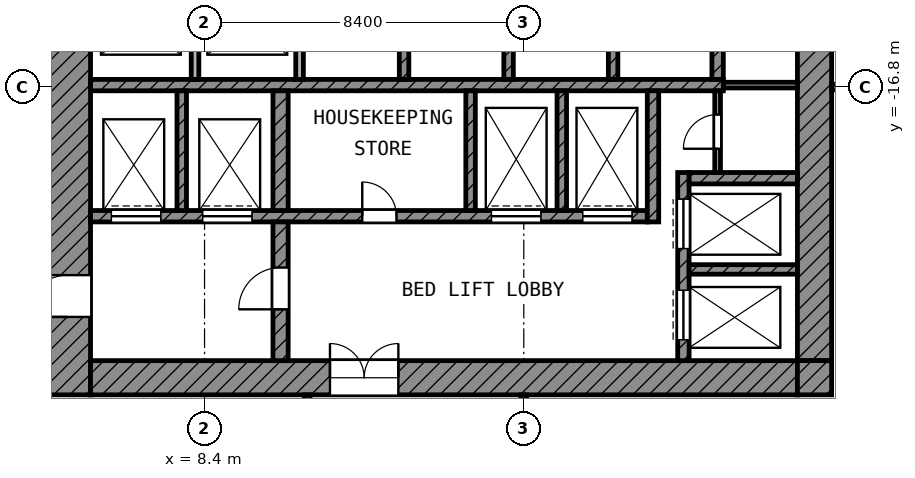
"""IFC4 building model, lengths in metres.
Left out: names, types, materials, properties, quantities, classifications, styles, units other than length and angle.
Written with IfcOpenShell. Run it as: python <this file> out.ifc"""

import sys

from ifc_helpers import new_model, si_unit, direction, frame, frame_2d, origin, place, context, subcontext, project, spatial, rectangle, extrude, element, fill, save


model = new_model("IFC4")
c1 = context("Model", 3, precision=1e-05, world=origin(), true_north=direction((0.0, 1.0)))
c2 = subcontext(c1, "Body", "Model", "MODEL_VIEW")
j1 = project(units=[si_unit("LENGTHUNIT", "METRE"), si_unit("PLANEANGLEUNIT", "RADIAN")], contexts=[c1])
p1 = place(None, origin())
s1 = spatial("IfcSite", under=j1, at=p1, CompositionType="ELEMENT")
p2 = place(p1, origin())
s2 = spatial("IfcBuilding", under=s1, at=p2, CompositionType="ELEMENT")
p3 = place(p2, frame((0.0, 0.0, 183.6)))
s3 = spatial("IfcBuildingStorey", under=s2, at=p3, CompositionType="ELEMENT", Elevation=183.6)
p4 = place(p3, frame((4.8, -24.9, 0.0), z_axis=(0.0, 0.0, 1.0), x_axis=(0.0, 1.0, 0.0)))
e1 = element("IfcWall", 1, at=p4, inside=s3, PredefinedType="SHEAR", context=c2, shape_type="SweptSolid", body=[
    extrude(rectangle(XDim=19.5, YDim=1.2, at=frame_2d((9.75, 0.0))), origin(), (0.0, 0.0, 1.0), 3.6),
])
p5 = place(p4, frame((11.35, 0.0, 0.0)))
e2 = element("IfcOpeningElement", 2, at=p5, cuts=e1, PredefinedType="OPENING", context=c2, shape_type="SweptSolid", body=[
    extrude(rectangle(XDim=1.1, YDim=2.1, at=frame_2d((0.55, 1.05))), frame((0.0, 0.61, 0.0), z_axis=(0.0, -1.0, 0.0), x_axis=(1.0, 0.0, 0.0)), (0.0, 0.0, 1.0), 1.22),
])
p6 = place(p4, frame((2.05, 0.0, 0.0)))
e3 = element("IfcOpeningElement", 3, at=p6, cuts=e1, PredefinedType="OPENING", context=c2, shape_type="SweptSolid", body=[
    extrude(rectangle(XDim=1.1, YDim=2.1, at=frame_2d((0.55, 1.05))), frame((0.0, 0.61, 0.0), z_axis=(0.0, -1.0, 0.0), x_axis=(1.0, 0.0, 0.0)), (0.0, 0.0, 1.0), 1.22),
])
p7 = place(p3, frame((24.45, -24.0, 0.0), z_axis=(0.0, 0.0, 1.0), x_axis=(0.0, 1.0, 0.0)))
e4 = element("IfcWall", 4, at=p7, inside=s3, PredefinedType="SHEAR", context=c2, shape_type="SweptSolid", body=[
    extrude(rectangle(XDim=18.6, YDim=0.9, at=frame_2d((9.3, 0.0))), origin(), (0.0, 0.0, 1.0), 3.6),
])
p8 = place(p7, frame((10.5, 0.0, 0.0)))
e5 = element("IfcOpeningElement", 5, at=p8, cuts=e4, PredefinedType="OPENING", context=c2, shape_type="SweptSolid", body=[
    extrude(rectangle(XDim=1.8, YDim=2.1, at=frame_2d((0.9, 1.05))), frame((0.0, 0.46, 0.0), z_axis=(0.0, -1.0, 0.0), x_axis=(1.0, 0.0, 0.0)), (0.0, 0.0, 1.0), 0.92),
])
p9 = place(p3, frame((5.4, -24.45, 0.0), z_axis=(0.0, 0.0, 1.0), x_axis=(1.0, 0.0, 0.0)))
e6 = element("IfcWall", 6, at=p9, inside=s3, PredefinedType="SHEAR", context=c2, shape_type="SweptSolid", body=[
    extrude(rectangle(XDim=18.6, YDim=0.9, at=frame_2d((9.3, 0.0))), origin(), (0.0, 0.0, 1.0), 3.6),
])
p10 = place(p9, frame((6.3, 0.0, 0.0)))
e7 = element("IfcOpeningElement", 7, at=p10, cuts=e6, PredefinedType="OPENING", context=c2, shape_type="SweptSolid", body=[
    extrude(rectangle(XDim=1.8, YDim=2.1, at=frame_2d((0.9, 1.05))), frame((0.0, 0.46, 0.0), z_axis=(0.0, -1.0, 0.0), x_axis=(1.0, 0.0, 0.0)), (0.0, 0.0, 1.0), 0.92),
])
p11 = place(p3, frame((24.45, -24.9, 0.0), z_axis=(0.0, 0.0, 1.0), x_axis=(0.0, 1.0, 0.0)))
e8 = element("IfcWall", 8, at=p11, inside=s3, PredefinedType="SHEAR", context=c2, shape_type="SweptSolid", body=[
    extrude(rectangle(XDim=0.9, YDim=0.9, at=frame_2d((0.45, 0.0))), origin(), (0.0, 0.0, 1.0), 3.6),
])
p12 = place(p3, frame((5.4, -16.75, 0.0), z_axis=(0.0, 0.0, 1.0), x_axis=(1.0, 0.0, 0.0)))
e9 = element("IfcWall", 9, at=p12, inside=s3, PredefinedType="SHEAR", context=c2, shape_type="SweptSolid", body=[
    extrude(rectangle(XDim=16.65, YDim=0.3, at=frame_2d((8.325, 0.0))), origin(), (0.0, 0.0, 1.0), 3.6),
])
p13 = place(p3, frame((5.4, -20.2, 0.0), z_axis=(0.0, 0.0, 1.0), x_axis=(1.0, 0.0, 0.0)))
e10 = element("IfcWall", 10, at=p13, inside=s3, PredefinedType="SHEAR", context=c2, shape_type="SweptSolid", body=[
    extrude(rectangle(XDim=14.65, YDim=0.3, at=frame_2d((7.325, 0.0))), origin(), (0.0, 0.0, 1.0), 3.6),
])
p14 = place(p13, frame((10.55, 0.0, 0.0)))
e11 = element("IfcOpeningElement", 11, at=p14, cuts=e10, PredefinedType="OPENING", context=c2, shape_type="SweptSolid", body=[
    extrude(rectangle(XDim=1.3, YDim=2.1, at=frame_2d((0.65, 1.05))), frame((0.0, 0.16, 0.0), z_axis=(0.0, -1.0, 0.0), x_axis=(1.0, 0.0, 0.0)), (0.0, 0.0, 1.0), 0.32),
])
p15 = place(p13, frame((12.95, 0.0, 0.0)))
e12 = element("IfcOpeningElement", 12, at=p15, cuts=e10, PredefinedType="OPENING", context=c2, shape_type="SweptSolid", body=[
    extrude(rectangle(XDim=1.3, YDim=2.1, at=frame_2d((0.65, 1.05))), frame((0.0, 0.16, 0.0), z_axis=(0.0, -1.0, 0.0), x_axis=(1.0, 0.0, 0.0)), (0.0, 0.0, 1.0), 0.32),
])
p16 = place(p13, frame((0.55, 0.0, 0.0)))
e13 = element("IfcOpeningElement", 13, at=p16, cuts=e10, PredefinedType="OPENING", context=c2, shape_type="SweptSolid", body=[
    extrude(rectangle(XDim=1.3, YDim=2.1, at=frame_2d((0.65, 1.05))), frame((0.0, 0.16, 0.0), z_axis=(0.0, -1.0, 0.0), x_axis=(1.0, 0.0, 0.0)), (0.0, 0.0, 1.0), 0.32),
])
p17 = place(p13, frame((2.95, 0.0, 0.0)))
e14 = element("IfcOpeningElement", 14, at=p17, cuts=e10, PredefinedType="OPENING", context=c2, shape_type="SweptSolid", body=[
    extrude(rectangle(XDim=1.3, YDim=2.1, at=frame_2d((0.65, 1.05))), frame((0.0, 0.16, 0.0), z_axis=(0.0, -1.0, 0.0), x_axis=(1.0, 0.0, 0.0)), (0.0, 0.0, 1.0), 0.32),
])
p18 = place(p13, frame((7.15, 0.0, 0.0)))
e15 = element("IfcOpeningElement", 15, at=p18, cuts=e10, PredefinedType="OPENING", context=c2, shape_type="SweptSolid", body=[
    extrude(rectangle(XDim=0.9, YDim=2.1, at=frame_2d((0.45, 1.05))), frame((0.0, 0.16, 0.0), z_axis=(0.0, -1.0, 0.0), x_axis=(1.0, 0.0, 0.0)), (0.0, 0.0, 1.0), 0.32),
])
p19 = place(p3, frame((10.4, -24.0, 0.0), z_axis=(0.0, 0.0, 1.0), x_axis=(0.0, 1.0, 0.0)))
e16 = element("IfcWall", 16, at=p19, inside=s3, PredefinedType="SHEAR", context=c2, shape_type="SweptSolid", body=[
    extrude(rectangle(XDim=3.65, YDim=0.4, at=frame_2d((1.825, 0.0))), origin(), (0.0, 0.0, 1.0), 3.6),
])
p20 = place(p19, frame((1.35, 0.0, 0.0)))
e17 = element("IfcOpeningElement", 17, at=p20, cuts=e16, PredefinedType="OPENING", context=c2, shape_type="SweptSolid", body=[
    extrude(rectangle(XDim=1.1, YDim=2.1, at=frame_2d((0.55, 1.05))), frame((0.0, 0.21, 0.0), z_axis=(0.0, -1.0, 0.0), x_axis=(1.0, 0.0, 0.0)), (0.0, 0.0, 1.0), 0.42),
])
p21 = place(p3, frame((10.4, -20.05, 0.0), z_axis=(0.0, 0.0, 1.0), x_axis=(0.0, 1.0, 0.0)))
e18 = element("IfcWall", 18, at=p21, inside=s3, PredefinedType="SHEAR", context=c2, shape_type="SweptSolid", body=[
    extrude(rectangle(XDim=3.15, YDim=0.4, at=frame_2d((1.575, 0.0))), origin(), (0.0, 0.0, 1.0), 3.6),
])
p22 = place(p3, frame((20.2, -20.35, 0.0), z_axis=(0.0, 0.0, 1.0), x_axis=(0.0, 1.0, 0.0)))
e19 = element("IfcWall", 19, at=p22, inside=s3, PredefinedType="SHEAR", context=c2, shape_type="SweptSolid", body=[
    extrude(rectangle(XDim=3.45, YDim=0.3, at=frame_2d((1.725, 0.0))), origin(), (0.0, 0.0, 1.0), 3.6),
])
p23 = place(p3, frame((21.9, -16.6, 0.0), z_axis=(0.0, 0.0, 1.0), x_axis=(0.0, 1.0, 0.0)))
e20 = element("IfcWall", 20, at=p23, inside=s3, PredefinedType="SHEAR", context=c2, shape_type="SweptSolid", body=[
    extrude(rectangle(XDim=2.35, YDim=0.3, at=frame_2d((1.175, 0.0))), origin(), (0.0, 0.0, 1.0), 3.6),
])
p24 = place(p3, frame((21.15, -19.2, 0.0), z_axis=(0.0, 0.0, 1.0), x_axis=(1.0, 0.0, 0.0)))
e21 = element("IfcWall", 21, at=p24, inside=s3, PredefinedType="SHEAR", context=c2, shape_type="SweptSolid", body=[
    extrude(rectangle(XDim=2.85, YDim=0.3, at=frame_2d((1.425, 0.0))), origin(), (0.0, 0.0, 1.0), 3.6),
])
p25 = place(p3, frame((21.0, -24.0, 0.0), z_axis=(0.0, 0.0, 1.0), x_axis=(0.0, 1.0, 0.0)))
e22 = element("IfcWall", 22, at=p25, inside=s3, PredefinedType="SHEAR", context=c2, shape_type="SweptSolid", body=[
    extrude(rectangle(XDim=4.95, YDim=0.3, at=frame_2d((2.475, 0.0))), origin(), (0.0, 0.0, 1.0), 3.6),
])
p26 = place(p25, frame((2.95, 0.0, 0.0)))
e23 = element("IfcOpeningElement", 23, at=p26, cuts=e22, PredefinedType="OPENING", context=c2, shape_type="SweptSolid", body=[
    extrude(rectangle(XDim=1.3, YDim=2.1, at=frame_2d((0.65, 1.05))), frame((0.0, 0.16, 0.0), z_axis=(0.0, -1.0, 0.0), x_axis=(1.0, 0.0, 0.0)), (0.0, 0.0, 1.0), 0.32),
])
p27 = place(p25, frame((0.55, 0.0, 0.0)))
e24 = element("IfcOpeningElement", 24, at=p27, cuts=e22, PredefinedType="OPENING", context=c2, shape_type="SweptSolid", body=[
    extrude(rectangle(XDim=1.3, YDim=2.1, at=frame_2d((0.65, 1.05))), frame((0.0, 0.16, 0.0), z_axis=(0.0, -1.0, 0.0), x_axis=(1.0, 0.0, 0.0)), (0.0, 0.0, 1.0), 0.32),
])
p28 = place(p3, frame((21.15, -21.6, 0.0), z_axis=(0.0, 0.0, 1.0), x_axis=(1.0, 0.0, 0.0)))
e25 = element("IfcWall", 25, at=p28, inside=s3, PredefinedType="SHEAR", context=c2, shape_type="SweptSolid", body=[
    extrude(rectangle(XDim=2.85, YDim=0.25, at=frame_2d((1.425, 0.0))), origin(), (0.0, 0.0, 1.0), 3.6),
])
for number, where, z_axis, x_axis in (
    (26, (7.8, -20.05, 0.0), (0.0, 0.0, 1.0), (0.0, 1.0, 0.0)),
    (27, (15.4, -20.05, 0.0), (0.0, 0.0, 1.0), (0.0, 1.0, 0.0)),
    (28, (17.8, -20.05, 0.0), (0.0, 0.0, 1.0), (0.0, 1.0, 0.0)),
):
    element("IfcWall", number, at=place(p3, frame(where, z_axis=z_axis, x_axis=x_axis)), inside=s3, PredefinedType="SHEAR", context=c2, shape_type="SweptSolid", body=[
        extrude(rectangle(XDim=3.15, YDim=0.25, at=frame_2d((1.575, 0.0))), origin(), (0.0, 0.0, 1.0), 3.6),
    ])
for number, where, z_axis, x_axis in (
    (29, (8.15, -16.6, 0.0), (0.0, 0.0, 1.0), (0.0, 1.0, 0.0)),
    (30, (10.9, -16.6, 0.0), (0.0, 0.0, 1.0), (0.0, 1.0, 0.0)),
):
    element("IfcWall", number, at=place(p3, frame(where, z_axis=z_axis, x_axis=x_axis)), inside=s3, PredefinedType="PARTITIONING", context=c2, shape_type="SweptSolid", body=[
        extrude(rectangle(XDim=2.35, YDim=0.2, at=frame_2d((1.175, 0.0))), origin(), (0.0, 0.0, 1.0), 3.6),
    ])
for number, where, z_axis, x_axis in (
    (31, (13.65, -16.6, 0.0), (0.0, 0.0, 1.0), (0.0, 1.0, 0.0)),
    (32, (16.4, -16.6, 0.0), (0.0, 0.0, 1.0), (0.0, 1.0, 0.0)),
    (33, (19.15, -16.6, 0.0), (0.0, 0.0, 1.0), (0.0, 1.0, 0.0)),
):
    element("IfcWall", number, at=place(p3, frame(where, z_axis=z_axis, x_axis=x_axis)), inside=s3, PredefinedType="SHEAR", context=c2, shape_type="SweptSolid", body=[
        extrude(rectangle(XDim=2.35, YDim=0.25, at=frame_2d((1.175, 0.0))), origin(), (0.0, 0.0, 1.0), 3.6),
    ])
p29 = place(p3, frame((21.9, -19.05, 0.0), z_axis=(0.0, 0.0, 1.0), x_axis=(0.0, 1.0, 0.0)))
e34 = element("IfcWall", 34, at=p29, inside=s3, PredefinedType="PARTITIONING", context=c2, shape_type="SweptSolid", body=[
    extrude(rectangle(XDim=2.15, YDim=0.15, at=frame_2d((1.075, 0.0))), origin(), (0.0, 0.0, 1.0), 3.6),
])
p30 = place(p29, frame((0.625, 0.0, 0.0)))
e35 = element("IfcOpeningElement", 35, at=p30, cuts=e34, PredefinedType="OPENING", context=c2, shape_type="SweptSolid", body=[
    extrude(rectangle(XDim=0.9, YDim=2.1, at=frame_2d((0.45, 1.05))), frame((0.0, 0.085, 0.0), z_axis=(0.0, -1.0, 0.0), x_axis=(1.0, 0.0, 0.0)), (0.0, 0.0, 1.0), 0.17),
])
p31 = place(p3, frame((22.05, -16.75, 0.0), z_axis=(0.0, 0.0, 1.0), x_axis=(1.0, 0.0, 0.0)))
e36 = element("IfcWall", 36, at=p31, inside=s3, PredefinedType="PARTITIONING", context=c2, shape_type="SweptSolid", body=[
    extrude(rectangle(XDim=1.95, YDim=0.15, at=frame_2d((0.975, 0.0))), origin(), (0.0, 0.0, 1.0), 3.6),
])
p32 = place(p3, frame((24.9, -16.8, 0.0), z_axis=(0.0, 0.0, 1.0), x_axis=(1.0, 0.0, 0.0)))
e37 = element("IfcWall", 37, at=p32, inside=s3, PredefinedType="PARTITIONING", context=c2, shape_type="SweptSolid", body=[
    extrude(rectangle(XDim=42.22, YDim=0.15, at=frame_2d((21.11, 0.0))), origin(), (0.0, 0.0, 1.0), 3.6),
])
p33 = place(p32, frame((1.65, 0.0, 0.0)))
e38 = element("IfcOpeningElement", 38, at=p33, cuts=e37, PredefinedType="OPENING", context=c2, shape_type="SweptSolid", body=[
    extrude(rectangle(XDim=1.5, YDim=2.1, at=frame_2d((0.75, 1.05))), frame((0.0, 0.085, 0.0), z_axis=(0.0, -1.0, 0.0), x_axis=(1.0, 0.0, 0.0)), (0.0, 0.0, 1.0), 0.17),
])
p34 = place(p32, frame((6.1, 0.0, 0.0)))
e39 = element("IfcOpeningElement", 39, at=p34, cuts=e37, PredefinedType="OPENING", context=c2, shape_type="SweptSolid", body=[
    extrude(rectangle(XDim=1.0, YDim=2.1, at=frame_2d((0.5, 1.05))), frame((0.0, 0.085, 0.0), z_axis=(0.0, -1.0, 0.0), x_axis=(1.0, 0.0, 0.0)), (0.0, 0.0, 1.0), 0.17),
])
p35 = place(p32, frame((10.2, 0.0, 0.0)))
e40 = element("IfcOpeningElement", 40, at=p35, cuts=e37, PredefinedType="OPENING", context=c2, shape_type="SweptSolid", body=[
    extrude(rectangle(XDim=1.2, YDim=2.1, at=frame_2d((0.6, 1.05))), frame((0.0, 0.085, 0.0), z_axis=(0.0, -1.0, 0.0), x_axis=(1.0, 0.0, 0.0)), (0.0, 0.0, 1.0), 0.17),
])
p36 = place(p32, frame((20.34, 0.0, 0.0)))
e41 = element("IfcOpeningElement", 41, at=p36, cuts=e37, PredefinedType="OPENING", context=c2, shape_type="SweptSolid", body=[
    extrude(rectangle(XDim=1.2, YDim=2.1, at=frame_2d((0.6, 1.05))), frame((0.0, 0.085, 0.0), z_axis=(0.0, -1.0, 0.0), x_axis=(1.0, 0.0, 0.0)), (0.0, 0.0, 1.0), 0.17),
])
p37 = place(p32, frame((18.78, 0.0, 0.0)))
e42 = element("IfcOpeningElement", 42, at=p37, cuts=e37, PredefinedType="OPENING", context=c2, shape_type="SweptSolid", body=[
    extrude(rectangle(XDim=1.2, YDim=2.1, at=frame_2d((0.6, 1.05))), frame((0.0, 0.085, 0.0), z_axis=(0.0, -1.0, 0.0), x_axis=(1.0, 0.0, 0.0)), (0.0, 0.0, 1.0), 0.17),
])
p38 = place(p32, frame((28.0, 0.0, 0.0)))
e43 = element("IfcOpeningElement", 43, at=p38, cuts=e37, PredefinedType="OPENING", context=c2, shape_type="SweptSolid", body=[
    extrude(rectangle(XDim=1.2, YDim=2.1, at=frame_2d((0.6, 1.05))), frame((0.0, 0.085, 0.0), z_axis=(0.0, -1.0, 0.0), x_axis=(1.0, 0.0, 0.0)), (0.0, 0.0, 1.0), 0.17),
])
p39 = place(p32, frame((26.48, 0.0, 0.0)))
e44 = element("IfcOpeningElement", 44, at=p39, cuts=e37, PredefinedType="OPENING", context=c2, shape_type="SweptSolid", body=[
    extrude(rectangle(XDim=1.2, YDim=2.1, at=frame_2d((0.6, 1.05))), frame((0.0, 0.085, 0.0), z_axis=(0.0, -1.0, 0.0), x_axis=(1.0, 0.0, 0.0)), (0.0, 0.0, 1.0), 0.17),
])
p40 = place(p32, frame((32.1, 0.0, 0.0)))
e45 = element("IfcOpeningElement", 45, at=p40, cuts=e37, PredefinedType="OPENING", context=c2, shape_type="SweptSolid", body=[
    extrude(rectangle(XDim=1.2, YDim=2.1, at=frame_2d((0.6, 1.05))), frame((0.0, 0.085, 0.0), z_axis=(0.0, -1.0, 0.0), x_axis=(1.0, 0.0, 0.0)), (0.0, 0.0, 1.0), 0.17),
])
p41 = place(p32, frame((37.35, 0.0, 0.0)))
e46 = element("IfcOpeningElement", 46, at=p41, cuts=e37, PredefinedType="OPENING", context=c2, shape_type="SweptSolid", body=[
    extrude(rectangle(XDim=1.5, YDim=2.1, at=frame_2d((0.75, 1.05))), frame((0.0, 0.085, 0.0), z_axis=(0.0, -1.0, 0.0), x_axis=(1.0, 0.0, 0.0)), (0.0, 0.0, 1.0), 0.17),
])
p42 = place(p3, frame((11.1, -29.399, 0.0), z_axis=(0.0, 0.0, 1.0), x_axis=(0.0, 1.0, 0.0)))
e47 = element("IfcWall", 47, at=p42, inside=s3, PredefinedType="PARTITIONING", context=c2, shape_type="SweptSolid", body=[
    extrude(rectangle(XDim=4.499, YDim=0.15, at=frame_2d((2.25, 0.0))), origin(), (0.0, 0.0, 1.0), 3.6),
])
p43 = place(p3, frame((16.8, -54.52, 0.0), z_axis=(0.0, 0.0, 1.0), x_axis=(0.0, 1.0, 0.0)))
e48 = element("IfcWall", 48, at=p43, inside=s3, PredefinedType="PARTITIONING", context=c2, shape_type="SweptSolid", body=[
    extrude(rectangle(XDim=29.62, YDim=0.15, at=frame_2d((14.81, 0.0))), origin(), (0.0, 0.0, 1.0), 3.6),
])
p44 = place(p43, frame((21.52, 0.0, 0.0)))
e49 = element("IfcOpeningElement", 49, at=p44, cuts=e48, PredefinedType="OPENING", context=c2, shape_type="SweptSolid", body=[
    extrude(rectangle(XDim=1.2, YDim=2.1, at=frame_2d((0.6, 1.05))), frame((0.0, 0.085, 0.0), z_axis=(0.0, -1.0, 0.0), x_axis=(1.0, 0.0, 0.0)), (0.0, 0.0, 1.0), 0.17),
])
p45 = place(p43, frame((10.76, 0.0, 0.0)))
e50 = element("IfcOpeningElement", 50, at=p45, cuts=e48, PredefinedType="OPENING", context=c2, shape_type="SweptSolid", body=[
    extrude(rectangle(XDim=1.2, YDim=2.1, at=frame_2d((0.6, 1.05))), frame((0.0, 0.085, 0.0), z_axis=(0.0, -1.0, 0.0), x_axis=(1.0, 0.0, 0.0)), (0.0, 0.0, 1.0), 0.17),
])
p46 = place(p43, frame((9.2, 0.0, 0.0)))
e51 = element("IfcOpeningElement", 51, at=p46, cuts=e48, PredefinedType="OPENING", context=c2, shape_type="SweptSolid", body=[
    extrude(rectangle(XDim=1.2, YDim=2.1, at=frame_2d((0.6, 1.05))), frame((0.0, 0.085, 0.0), z_axis=(0.0, -1.0, 0.0), x_axis=(1.0, 0.0, 0.0)), (0.0, 0.0, 1.0), 0.17),
])
p47 = place(p43, frame((7.99, 0.0, 0.0)))
e52 = element("IfcOpeningElement", 52, at=p47, cuts=e48, PredefinedType="OPENING", context=c2, shape_type="SweptSolid", body=[
    extrude(rectangle(XDim=0.9, YDim=2.1, at=frame_2d((0.45, 1.05))), frame((0.0, 0.085, 0.0), z_axis=(0.0, -1.0, 0.0), x_axis=(1.0, 0.0, 0.0)), (0.0, 0.0, 1.0), 0.17),
])
p48 = place(p43, frame((2.07, 0.0, 0.0)))
e53 = element("IfcOpeningElement", 53, at=p48, cuts=e48, PredefinedType="OPENING", context=c2, shape_type="SweptSolid", body=[
    extrude(rectangle(XDim=1.5, YDim=2.1, at=frame_2d((0.75, 1.05))), frame((0.0, 0.085, 0.0), z_axis=(0.0, -1.0, 0.0), x_axis=(1.0, 0.0, 0.0)), (0.0, 0.0, 1.0), 0.17),
])
p49 = place(p26, origin())
e54 = element("IfcDoor", 54, at=p49, inside=s3, OperationType="DOUBLE_DOOR_SLIDING", PredefinedType="DOOR", context=c2, shape_type="SweptSolid", body=[
    extrude(rectangle(XDim=1.3, YDim=2.1, at=frame_2d((0.65, 1.05))), frame((0.0, 0.025, 0.0), z_axis=(0.0, -1.0, 0.0), x_axis=(1.0, 0.0, 0.0)), (0.0, 0.0, 1.0), 0.05),
])
fill(e23, e54)
p50 = place(p27, origin())
e55 = element("IfcDoor", 55, at=p50, inside=s3, OperationType="DOUBLE_DOOR_SLIDING", PredefinedType="DOOR", context=c2, shape_type="SweptSolid", body=[
    extrude(rectangle(XDim=1.3, YDim=2.1, at=frame_2d((0.65, 1.05))), frame((0.0, 0.025, 0.0), z_axis=(0.0, -1.0, 0.0), x_axis=(1.0, 0.0, 0.0)), (0.0, 0.0, 1.0), 0.05),
])
fill(e24, e55)
p51 = place(p14, origin())
e56 = element("IfcDoor", 56, at=p51, inside=s3, OperationType="DOUBLE_DOOR_SLIDING", PredefinedType="DOOR", context=c2, shape_type="SweptSolid", body=[
    extrude(rectangle(XDim=1.3, YDim=2.1, at=frame_2d((0.65, 1.05))), frame((0.0, 0.025, 0.0), z_axis=(0.0, -1.0, 0.0), x_axis=(1.0, 0.0, 0.0)), (0.0, 0.0, 1.0), 0.05),
])
fill(e11, e56)
p52 = place(p15, origin())
e57 = element("IfcDoor", 57, at=p52, inside=s3, OperationType="DOUBLE_DOOR_SLIDING", PredefinedType="DOOR", context=c2, shape_type="SweptSolid", body=[
    extrude(rectangle(XDim=1.3, YDim=2.1, at=frame_2d((0.65, 1.05))), frame((0.0, 0.025, 0.0), z_axis=(0.0, -1.0, 0.0), x_axis=(1.0, 0.0, 0.0)), (0.0, 0.0, 1.0), 0.05),
])
fill(e12, e57)
p53 = place(p16, origin())
e58 = element("IfcDoor", 58, at=p53, inside=s3, OperationType="DOUBLE_DOOR_SLIDING", PredefinedType="DOOR", context=c2, shape_type="SweptSolid", body=[
    extrude(rectangle(XDim=1.3, YDim=2.1, at=frame_2d((0.65, 1.05))), frame((0.0, 0.025, 0.0), z_axis=(0.0, -1.0, 0.0), x_axis=(1.0, 0.0, 0.0)), (0.0, 0.0, 1.0), 0.05),
])
fill(e13, e58)
p54 = place(p17, origin())
e59 = element("IfcDoor", 59, at=p54, inside=s3, OperationType="DOUBLE_DOOR_SLIDING", PredefinedType="DOOR", context=c2, shape_type="SweptSolid", body=[
    extrude(rectangle(XDim=1.3, YDim=2.1, at=frame_2d((0.65, 1.05))), frame((0.0, 0.025, 0.0), z_axis=(0.0, -1.0, 0.0), x_axis=(1.0, 0.0, 0.0)), (0.0, 0.0, 1.0), 0.05),
])
fill(e14, e59)
p55 = place(p6, origin())
e60 = element("IfcDoor", 60, at=p55, inside=s3, OperationType="SINGLE_SWING_LEFT", PredefinedType="DOOR", context=c2, shape_type="SweptSolid", body=[
    extrude(rectangle(XDim=1.1, YDim=2.1, at=frame_2d((0.55, 1.05))), frame((0.0, 0.025, 0.0), z_axis=(0.0, -1.0, 0.0), x_axis=(1.0, 0.0, 0.0)), (0.0, 0.0, 1.0), 0.05),
])
fill(e3, e60)
p56 = place(p20, origin())
e61 = element("IfcDoor", 61, at=p56, inside=s3, OperationType="SINGLE_SWING_LEFT", PredefinedType="DOOR", context=c2, shape_type="SweptSolid", body=[
    extrude(rectangle(XDim=1.1, YDim=2.1, at=frame_2d((0.55, 1.05))), frame((0.0, 0.025, 0.0), z_axis=(0.0, -1.0, 0.0), x_axis=(1.0, 0.0, 0.0)), (0.0, 0.0, 1.0), 0.05),
])
fill(e17, e61)
p57 = place(p10, origin())
e62 = element("IfcDoor", 62, at=p57, inside=s3, OperationType="DOUBLE_DOOR_SINGLE_SWING", PredefinedType="DOOR", context=c2, shape_type="SweptSolid", body=[
    extrude(rectangle(XDim=1.8, YDim=2.1, at=frame_2d((0.9, 1.05))), frame((0.0, 0.025, 0.0), z_axis=(0.0, -1.0, 0.0), x_axis=(1.0, 0.0, 0.0)), (0.0, 0.0, 1.0), 0.05),
])
fill(e7, e62)
p58 = place(p30, origin())
e63 = element("IfcDoor", 63, at=p58, inside=s3, OperationType="SINGLE_SWING_LEFT", PredefinedType="DOOR", context=c2, shape_type="SweptSolid", body=[
    extrude(rectangle(XDim=0.9, YDim=2.1, at=frame_2d((0.45, 1.05))), frame((0.0, 0.025, 0.0), z_axis=(0.0, -1.0, 0.0), x_axis=(1.0, 0.0, 0.0)), (0.0, 0.0, 1.0), 0.05),
])
fill(e35, e63)
p59 = place(p18, origin())
e64 = element("IfcDoor", 64, at=p59, inside=s3, OperationType="SINGLE_SWING_LEFT", PredefinedType="DOOR", context=c2, shape_type="SweptSolid", body=[
    extrude(rectangle(XDim=0.9, YDim=2.1, at=frame_2d((0.45, 1.05))), frame((0.0, 0.025, 0.0), z_axis=(0.0, -1.0, 0.0), x_axis=(1.0, 0.0, 0.0)), (0.0, 0.0, 1.0), 0.05),
])
fill(e15, e64)
save(model, sys.argv[1])
